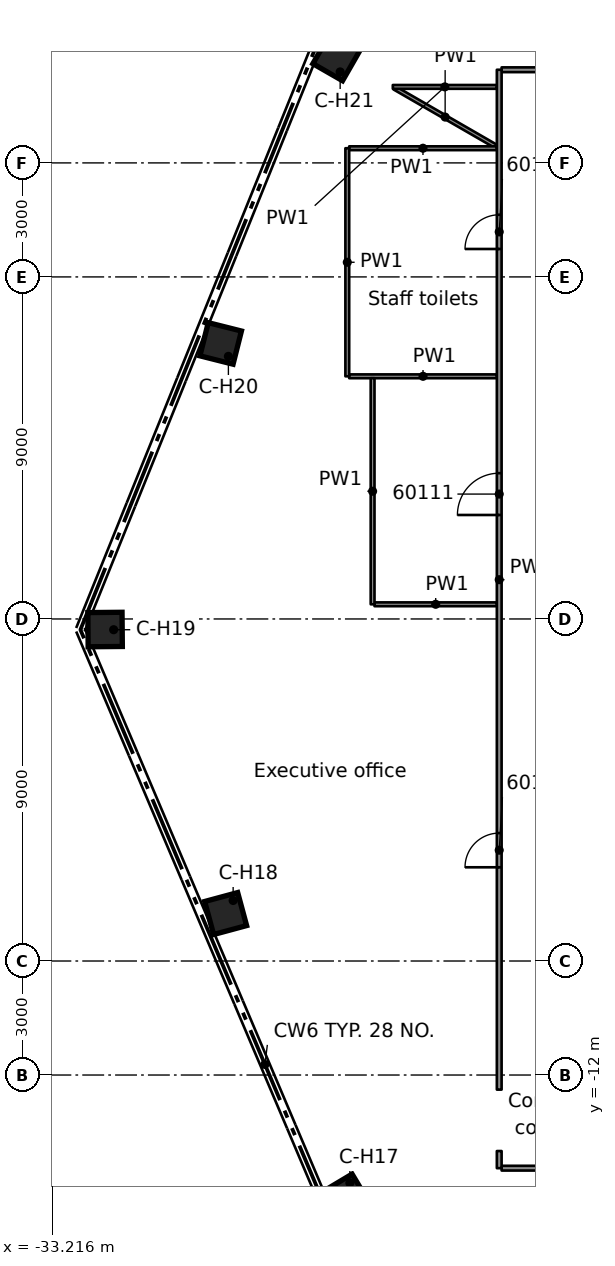
"""IFC4 building model, lengths in metres.
Left out: names, types, materials, properties, quantities, classifications, styles, units other than length and angle.
Written with IfcOpenShell. Run it as: python <this file> out.ifc"""

import sys

from ifc_helpers import new_model, si_unit, direction, frame, frame_2d, origin, origin_2d, place, context, subcontext, project, spatial, rectangle, extrude, element, fill, save


model = new_model("IFC4")
c1 = context("Model", 3, precision=1e-05, world=origin(), true_north=direction((0.0, 1.0)))
c2 = subcontext(c1, "Body", "Model", "MODEL_VIEW")
j1 = project(units=[si_unit("LENGTHUNIT", "METRE"), si_unit("PLANEANGLEUNIT", "RADIAN")], contexts=[c1])
p1 = place(None, origin())
s1 = spatial("IfcSite", under=j1, at=p1, CompositionType="ELEMENT")
p2 = place(p1, origin())
s2 = spatial("IfcBuilding", under=s1, at=p2, CompositionType="ELEMENT")
p3 = place(p2, frame((0.0, 0.0, 292.9)))
s3 = spatial("IfcBuildingStorey", under=s2, at=p3, CompositionType="ELEMENT", Elevation=292.9)
for number, where, z_axis, x_axis in (
    (1, (-25.477, -15.224, 0.0), (0.0, 0.0, 1.0), (-0.858, -0.513, 0.0)),
    (2, (-28.649, -7.751, 0.0), (0.0, 0.0, 1.0), (-0.965, -0.261, 0.0)),
    (3, (-31.821, -0.278, 0.0), (0.0, 0.0, 1.0), (-1.0, -0.009, 0.0)),
    (4, (-28.78, 7.25, 0.0), (0.0, 0.0, 1.0), (-0.97, 0.244, 0.0)),
    (5, (-25.739, 14.777, 0.0), (0.0, 0.0, 1.0), (-0.867, 0.498, 0.0)),
):
    element("IfcColumn", number, at=place(p3, frame(where, z_axis=z_axis, x_axis=x_axis)), inside=s3, PredefinedType="COLUMN", context=c2, shape_type="SweptSolid", body=[
        extrude(rectangle(XDim=0.9, YDim=0.9, at=origin_2d()), origin(), (0.0, 0.0, 1.0), 3.5),
    ])
p4 = place(p3, frame((-24.206, 13.975, 0.0), z_axis=(0.0, 0.0, 1.0), x_axis=(0.866185586049, -0.49972245349, 0.0)))
e6 = element("IfcWall", 6, at=p4, inside=s3, PredefinedType="PARTITIONING", context=c2, shape_type="SweptSolid", body=[
    extrude(rectangle(XDim=3.078, YDim=0.1, at=frame_2d((1.539, 0.0))), origin(), (0.0, 0.0, 1.0), 3.08),
])
p5 = place(p3, frame((-10.35, -14.451, 0.0), z_axis=(0.0, 0.0, 1.0), x_axis=(-1.0, 0.0, 0.0)))
e7 = element("IfcWall", 7, at=p5, inside=s3, PredefinedType="PARTITIONING", context=c2, shape_type="SweptSolid", body=[
    extrude(rectangle(XDim=11.037, YDim=0.125, at=frame_2d((5.519, 0.0))), origin(), (0.0, 0.0, 1.0), 3.08),
])
p6 = place(p5, frame((4.6, 0.0, 0.0)))
e8 = element("IfcOpeningElement", 8, at=p6, cuts=e7, PredefinedType="OPENING", context=c2, shape_type="SweptSolid", body=[
    extrude(rectangle(XDim=1.8, YDim=2.1, at=frame_2d((0.9, 1.05))), frame((0.0, 0.073, 0.0), z_axis=(0.0, -1.0, 0.0), x_axis=(1.0, 0.0, 0.0)), (0.0, 0.0, 1.0), 0.145),
])
p7 = place(p3, frame((-24.732, 0.386, 0.0), z_axis=(0.0, 0.0, 1.0), x_axis=(1.0, 0.0, 0.0)))
e9 = element("IfcWall", 9, at=p7, inside=s3, PredefinedType="PARTITIONING", context=c2, shape_type="SweptSolid", body=[
    extrude(rectangle(XDim=3.22, YDim=0.1, at=frame_2d((1.61, 0.0))), origin(), (0.0, 0.0, 1.0), 3.08),
])
p8 = place(p3, frame((-25.398, 6.385, 0.0), z_axis=(0.0, 0.0, 1.0), x_axis=(1.0, 0.0, 0.0)))
e10 = element("IfcWall", 10, at=p8, inside=s3, PredefinedType="PARTITIONING", context=c2, shape_type="SweptSolid", body=[
    extrude(rectangle(XDim=3.886, YDim=0.1, at=frame_2d((1.943, 0.0))), origin(), (0.0, 0.0, 1.0), 3.08),
])
p9 = place(p3, frame((-25.398, 12.386, 0.0), z_axis=(0.0, 0.0, 1.0), x_axis=(1.0, 0.0, 0.0)))
e11 = element("IfcWall", 11, at=p9, inside=s3, PredefinedType="PARTITIONING", context=c2, shape_type="SweptSolid", body=[
    extrude(rectangle(XDim=3.883, YDim=0.1, at=frame_2d((1.941, 0.0))), origin(), (0.0, 0.0, 1.0), 3.08),
])
p10 = place(p3, frame((-24.25, 14.0, 0.0), z_axis=(0.0, 0.0, 1.0), x_axis=(1.0, 0.0, 0.0)))
e12 = element("IfcWall", 12, at=p10, inside=s3, PredefinedType="PARTITIONING", context=c2, shape_type="SweptSolid", body=[
    extrude(rectangle(XDim=2.738, YDim=0.1, at=frame_2d((1.369, 0.0))), origin(), (0.0, 0.0, 1.0), 3.08),
])
p11 = place(p3, frame((-21.387, 14.451, 0.0), z_axis=(0.0, 0.0, 1.0), x_axis=(1.0, 0.0, 0.0)))
e13 = element("IfcWall", 13, at=p11, inside=s3, PredefinedType="PARTITIONING", context=c2, shape_type="SweptSolid", body=[
    extrude(rectangle(XDim=10.996, YDim=0.125, at=frame_2d((5.498, 0.0))), origin(), (0.0, 0.0, 1.0), 3.08),
])
p12 = place(p11, frame((4.538, 0.0, 0.0)))
e14 = element("IfcOpeningElement", 14, at=p12, cuts=e13, PredefinedType="OPENING", context=c2, shape_type="SweptSolid", body=[
    extrude(rectangle(XDim=1.8, YDim=2.1, at=frame_2d((0.9, 1.05))), frame((0.0, 0.073, 0.0), z_axis=(0.0, -1.0, 0.0), x_axis=(1.0, 0.0, 0.0)), (0.0, 0.0, 1.0), 0.145),
])
p13 = place(p3, frame((-21.45, -14.451, 0.0), z_axis=(0.0, 0.0, 1.0), x_axis=(0.0, 1.0, 0.0)))
e15 = element("IfcWall", 15, at=p13, inside=s3, PredefinedType="PARTITIONING", context=c2, shape_type="SweptSolid", body=[
    extrude(rectangle(XDim=0.451, YDim=0.125, at=frame_2d((0.226, 0.0))), origin(), (0.0, 0.0, 1.0), 3.08),
])
p14 = place(p3, frame((-21.45, -12.384, 0.0), z_axis=(0.0, 0.0, 1.0), x_axis=(0.0, 1.0, 0.0)))
e16 = element("IfcWall", 16, at=p14, inside=s3, PredefinedType="PARTITIONING", context=c2, shape_type="SweptSolid", body=[
    extrude(rectangle(XDim=26.835, YDim=0.125, at=frame_2d((13.417, 0.0))), origin(), (0.0, 0.0, 1.0), 3.08),
])
p15 = place(p14, frame((5.85, 0.0, 0.0)))
e17 = element("IfcOpeningElement", 17, at=p15, cuts=e16, PredefinedType="OPENING", context=c2, shape_type="SweptSolid", body=[
    extrude(rectangle(XDim=0.9, YDim=2.1, at=frame_2d((0.45, 1.05))), frame((0.0, 0.073, 0.0), z_axis=(0.0, -1.0, 0.0), x_axis=(1.0, 0.0, 0.0)), (0.0, 0.0, 1.0), 0.145),
])
p16 = place(p14, frame((22.119, 0.0, 0.0)))
e18 = element("IfcOpeningElement", 18, at=p16, cuts=e16, PredefinedType="OPENING", context=c2, shape_type="SweptSolid", body=[
    extrude(rectangle(XDim=0.9, YDim=2.1, at=frame_2d((0.45, 1.05))), frame((0.0, 0.073, 0.0), z_axis=(0.0, -1.0, 0.0), x_axis=(1.0, 0.0, 0.0)), (0.0, 0.0, 1.0), 0.145),
])
p17 = place(p14, frame((15.12, 0.0, 0.0)))
e19 = element("IfcOpeningElement", 19, at=p17, cuts=e16, PredefinedType="OPENING", context=c2, shape_type="SweptSolid", body=[
    extrude(rectangle(XDim=1.1, YDim=2.1, at=frame_2d((0.55, 1.05))), frame((0.0, 0.073, 0.0), z_axis=(0.0, -1.0, 0.0), x_axis=(1.0, 0.0, 0.0)), (0.0, 0.0, 1.0), 0.145),
])
p18 = place(p3, frame((-24.782, 0.386, 0.0), z_axis=(0.0, 0.0, 1.0), x_axis=(0.0, 1.0, 0.0)))
e20 = element("IfcWall", 20, at=p18, inside=s3, PredefinedType="PARTITIONING", context=c2, shape_type="SweptSolid", body=[
    extrude(rectangle(XDim=5.949, YDim=0.1, at=frame_2d((2.975, 0.0))), origin(), (0.0, 0.0, 1.0), 3.08),
])
p19 = place(p3, frame((-25.448, 6.385, 0.0), z_axis=(0.0, 0.0, 1.0), x_axis=(0.0, 1.0, 0.0)))
e21 = element("IfcWall", 21, at=p19, inside=s3, PredefinedType="PARTITIONING", context=c2, shape_type="SweptSolid", body=[
    extrude(rectangle(XDim=6.001, YDim=0.1, at=frame_2d((3.0, 0.0))), origin(), (0.0, 0.0, 1.0), 3.08),
])
p20 = place(p15, origin())
e22 = element("IfcDoor", 22, at=p20, inside=s3, OperationType="SINGLE_SWING_LEFT", PredefinedType="DOOR", context=c2, shape_type="SweptSolid", body=[
    extrude(rectangle(XDim=0.9, YDim=2.1, at=frame_2d((0.45, 1.05))), frame((0.0, 0.025, 0.0), z_axis=(0.0, -1.0, 0.0), x_axis=(1.0, 0.0, 0.0)), (0.0, 0.0, 1.0), 0.05),
])
fill(e17, e22)
p21 = place(p16, origin())
e23 = element("IfcDoor", 23, at=p21, inside=s3, OperationType="SINGLE_SWING_RIGHT", PredefinedType="DOOR", context=c2, shape_type="SweptSolid", body=[
    extrude(rectangle(XDim=0.9, YDim=2.1, at=frame_2d((0.45, 1.05))), frame((0.0, 0.025, 0.0), z_axis=(0.0, -1.0, 0.0), x_axis=(1.0, 0.0, 0.0)), (0.0, 0.0, 1.0), 0.05),
])
fill(e18, e23)
p22 = place(p17, origin())
e24 = element("IfcDoor", 24, at=p22, inside=s3, OperationType="SINGLE_SWING_RIGHT", PredefinedType="DOOR", context=c2, shape_type="SweptSolid", body=[
    extrude(rectangle(XDim=1.1, YDim=2.1, at=frame_2d((0.55, 1.05))), frame((0.0, 0.025, 0.0), z_axis=(0.0, -1.0, 0.0), x_axis=(1.0, 0.0, 0.0)), (0.0, 0.0, 1.0), 0.05),
])
fill(e19, e24)
save(model, sys.argv[1])
